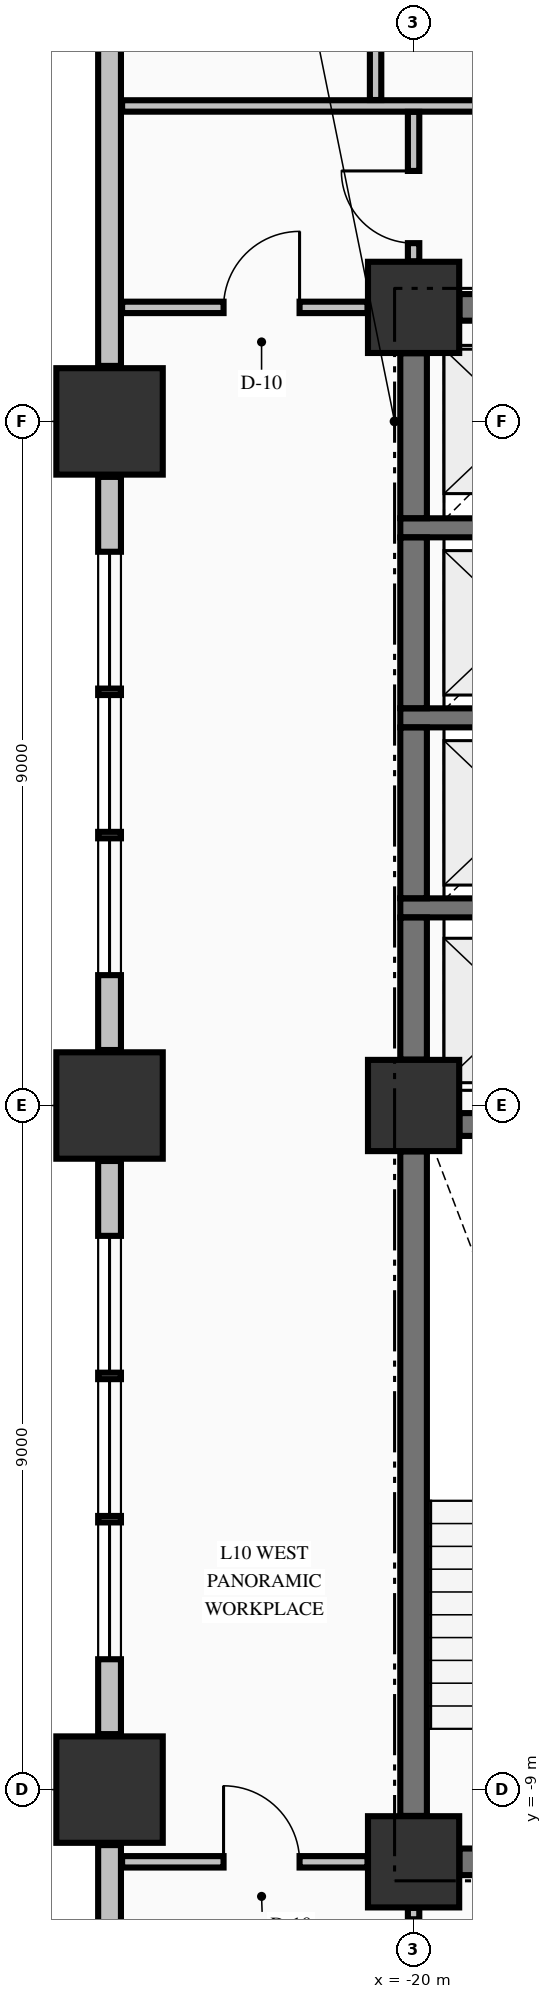
"""IFC4 building model, lengths in metres.
Left out: names, types, materials, properties, quantities, classifications, styles, units other than length and angle.
Written with IfcOpenShell. Run it as: python <this file> out.ifc"""

import sys

from ifc_helpers import new_model, si_unit, direction, frame, frame_2d, origin, origin_2d, place, context, subcontext, project, spatial, rectangle, extrude, element, fill, save


model = new_model("IFC4")
c1 = context("Model", 3, precision=1e-05, world=origin(), true_north=direction((0.0, 1.0)))
c2 = subcontext(c1, "Body", "Model", "MODEL_VIEW")
j1 = project(units=[si_unit("LENGTHUNIT", "METRE"), si_unit("PLANEANGLEUNIT", "RADIAN")], contexts=[c1])
p1 = place(None, origin())
s1 = spatial("IfcSite", under=j1, at=p1, CompositionType="ELEMENT")
p2 = place(p1, origin())
s2 = spatial("IfcBuilding", under=s1, at=p2, CompositionType="ELEMENT")
p3 = place(p2, frame((0.0, 0.0, 45.05)))
s3 = spatial("IfcBuildingStorey", under=s2, at=p3, CompositionType="ELEMENT", Elevation=45.05)
for number, where, z_axis, x_axis in (
    (1, (-24.0, -9.0, -0.25), (0.0, 0.0, 1.0), (1.0, 0.0, 0.0)),
    (2, (-24.0, 0.0, -0.25), (0.0, 0.0, 1.0), (1.0, 0.0, 0.0)),
    (3, (-24.0, 9.0, -0.25), (0.0, 0.0, 1.0), (1.0, 0.0, 0.0)),
):
    element("IfcColumn", number, at=place(p3, frame(where, z_axis=z_axis, x_axis=x_axis)), inside=s3, PredefinedType="COLUMN", context=c2, shape_type="SweptSolid", body=[
        extrude(rectangle(XDim=1.4, YDim=1.4, at=origin_2d()), origin(), (0.0, 0.0, 1.0), 3.57),
    ])
for number, where, z_axis, x_axis in (
    (4, (-20.0, -9.95, -0.25), (0.0, 0.0, 1.0), (1.0, 0.0, 0.0)),
    (5, (-20.0, 10.5, -0.25), (0.0, 0.0, 1.0), (1.0, 0.0, 0.0)),
    (6, (-20.0, 0.0, -0.25), (0.0, 0.0, 1.0), (1.0, 0.0, 0.0)),
):
    element("IfcColumn", number, at=place(p3, frame(where, z_axis=z_axis, x_axis=x_axis)), inside=s3, PredefinedType="COLUMN", context=c2, shape_type="SweptSolid", body=[
        extrude(rectangle(XDim=1.2, YDim=1.2, at=origin_2d()), origin(), (0.0, 0.0, 1.0), 3.57),
    ])
p4 = place(p3, frame((-24.0, -9.73, 0.0), z_axis=(0.0, 0.0, 1.0), x_axis=(0.0, -1.0, 0.0)))
e7 = element("IfcWall", 7, at=p4, inside=s3, PredefinedType="STANDARD", context=c2, shape_type="SweptSolid", body=[
    extrude(rectangle(XDim=12.54, YDim=0.3, at=frame_2d((6.27, 0.0))), origin(), (0.0, 0.0, 1.0), 2.712),
])
p5 = place(p3, frame((-24.0, -0.73, 0.0), z_axis=(0.0, 0.0, 1.0), x_axis=(0.0, -1.0, 0.0)))
e8 = element("IfcWall", 8, at=p5, inside=s3, PredefinedType="STANDARD", context=c2, shape_type="SweptSolid", body=[
    extrude(rectangle(XDim=7.54, YDim=0.3, at=frame_2d((3.77, 0.0))), origin(), (0.0, 0.0, 1.0), 2.712),
])
p6 = place(p5, frame((0.985, 0.0, 0.78)))
e9 = element("IfcOpeningElement", 9, at=p6, cuts=e8, PredefinedType="OPENING", context=c2, shape_type="SweptSolid", body=[
    extrude(rectangle(XDim=1.8, YDim=1.72, at=frame_2d((0.9, 0.86))), frame((0.0, 0.16, 0.0), z_axis=(0.0, -1.0, 0.0), x_axis=(1.0, 0.0, 0.0)), (0.0, 0.0, 1.0), 0.32),
])
p7 = place(p5, frame((2.87, 0.0, 0.78)))
e10 = element("IfcOpeningElement", 10, at=p7, cuts=e8, PredefinedType="OPENING", context=c2, shape_type="SweptSolid", body=[
    extrude(rectangle(XDim=1.8, YDim=1.72, at=frame_2d((0.9, 0.86))), frame((0.0, 0.16, 0.0), z_axis=(0.0, -1.0, 0.0), x_axis=(1.0, 0.0, 0.0)), (0.0, 0.0, 1.0), 0.32),
])
p8 = place(p5, frame((4.755, 0.0, 0.78)))
e11 = element("IfcOpeningElement", 11, at=p8, cuts=e8, PredefinedType="OPENING", context=c2, shape_type="SweptSolid", body=[
    extrude(rectangle(XDim=1.8, YDim=1.72, at=frame_2d((0.9, 0.86))), frame((0.0, 0.16, 0.0), z_axis=(0.0, -1.0, 0.0), x_axis=(1.0, 0.0, 0.0)), (0.0, 0.0, 1.0), 0.32),
])
p9 = place(p3, frame((-24.0, 8.27, 0.0), z_axis=(0.0, 0.0, 1.0), x_axis=(0.0, -1.0, 0.0)))
e12 = element("IfcWall", 12, at=p9, inside=s3, PredefinedType="STANDARD", context=c2, shape_type="SweptSolid", body=[
    extrude(rectangle(XDim=7.54, YDim=0.3, at=frame_2d((3.77, 0.0))), origin(), (0.0, 0.0, 1.0), 2.712),
])
p10 = place(p9, frame((0.985, 0.0, 0.78)))
e13 = element("IfcOpeningElement", 13, at=p10, cuts=e12, PredefinedType="OPENING", context=c2, shape_type="SweptSolid", body=[
    extrude(rectangle(XDim=1.8, YDim=1.72, at=frame_2d((0.9, 0.86))), frame((0.0, 0.16, 0.0), z_axis=(0.0, -1.0, 0.0), x_axis=(1.0, 0.0, 0.0)), (0.0, 0.0, 1.0), 0.32),
])
p11 = place(p9, frame((2.87, 0.0, 0.78)))
e14 = element("IfcOpeningElement", 14, at=p11, cuts=e12, PredefinedType="OPENING", context=c2, shape_type="SweptSolid", body=[
    extrude(rectangle(XDim=1.8, YDim=1.72, at=frame_2d((0.9, 0.86))), frame((0.0, 0.16, 0.0), z_axis=(0.0, -1.0, 0.0), x_axis=(1.0, 0.0, 0.0)), (0.0, 0.0, 1.0), 0.32),
])
p12 = place(p9, frame((4.755, 0.0, 0.78)))
e15 = element("IfcOpeningElement", 15, at=p12, cuts=e12, PredefinedType="OPENING", context=c2, shape_type="SweptSolid", body=[
    extrude(rectangle(XDim=1.8, YDim=1.72, at=frame_2d((0.9, 0.86))), frame((0.0, 0.16, 0.0), z_axis=(0.0, -1.0, 0.0), x_axis=(1.0, 0.0, 0.0)), (0.0, 0.0, 1.0), 0.32),
])
p13 = place(p3, frame((-24.0, 22.27, 0.0), z_axis=(0.0, 0.0, 1.0), x_axis=(0.0, -1.0, 0.0)))
e16 = element("IfcWall", 16, at=p13, inside=s3, PredefinedType="STANDARD", context=c2, shape_type="SweptSolid", body=[
    extrude(rectangle(XDim=12.54, YDim=0.3, at=frame_2d((6.27, 0.0))), origin(), (0.0, 0.0, 1.0), 2.712),
])
p14 = place(p3, frame((-19.396, -9.95, 0.0), z_axis=(0.0, 0.0, 1.0), x_axis=(1.0, 0.0, 0.0)))
e17 = element("IfcWall", 17, at=p14, inside=s3, PredefinedType="SHEAR", context=c2, shape_type="SweptSolid", body=[
    extrude(rectangle(XDim=4.696, YDim=0.35, at=frame_2d((2.348, 0.0))), origin(), (0.0, 0.0, 1.0), 3.32),
])
p15 = place(p14, frame((0.571, 0.0, 0.0)))
e18 = element("IfcOpeningElement", 18, at=p15, cuts=e17, PredefinedType="OPENING", context=c2, shape_type="SweptSolid", body=[
    extrude(rectangle(XDim=1.05, YDim=2.15, at=frame_2d((0.525, 1.075))), frame((0.0, 0.185, 0.0), z_axis=(0.0, -1.0, 0.0), x_axis=(1.0, 0.0, 0.0)), (0.0, 0.0, 1.0), 0.37),
])
p16 = place(p3, frame((-19.396, -0.25, 0.0), z_axis=(0.0, 0.0, 1.0), x_axis=(1.0, 0.0, 0.0)))
e19 = element("IfcWall", 19, at=p16, inside=s3, PredefinedType="SHEAR", context=c2, shape_type="SweptSolid", body=[
    extrude(rectangle(XDim=7.792, YDim=0.3, at=frame_2d((3.896, 0.0))), origin(), (0.0, 0.0, 1.0), 3.32),
])
p17 = place(p16, frame((5.696, 0.0, 0.0)))
e20 = element("IfcOpeningElement", 20, at=p17, cuts=e19, PredefinedType="OPENING", context=c2, shape_type="SweptSolid", body=[
    extrude(rectangle(XDim=1.1, YDim=2.15, at=frame_2d((0.55, 1.075))), frame((0.0, 0.16, 0.0), z_axis=(0.0, -1.0, 0.0), x_axis=(1.0, 0.0, 0.0)), (0.0, 0.0, 1.0), 0.32),
])
for number, where, z_axis, x_axis in (
    (21, (-20.175, 2.6, 0.0), (0.0, 0.0, 1.0), (1.0, 0.0, 0.0)),
    (22, (-20.175, 5.1, 0.0), (0.0, 0.0, 1.0), (1.0, 0.0, 0.0)),
    (23, (-20.175, 7.6, 0.0), (0.0, 0.0, 1.0), (1.0, 0.0, 0.0)),
):
    element("IfcWall", number, at=place(p3, frame(where, z_axis=z_axis, x_axis=x_axis)), inside=s3, PredefinedType="SOLIDWALL", context=c2, shape_type="SweptSolid", body=[
        extrude(rectangle(XDim=3.1, YDim=0.25, at=frame_2d((1.55, 0.0))), origin(), (0.0, 0.0, 1.0), 3.32),
    ])
p18 = place(p3, frame((-19.396, 10.5, 0.0), z_axis=(0.0, 0.0, 1.0), x_axis=(1.0, 0.0, 0.0)))
e24 = element("IfcWall", 24, at=p18, inside=s3, PredefinedType="SHEAR", context=c2, shape_type="SweptSolid", body=[
    extrude(rectangle(XDim=4.696, YDim=0.35, at=frame_2d((2.348, 0.0))), origin(), (0.0, 0.0, 1.0), 3.32),
])
p19 = place(p18, frame((2.796, 0.0, 0.0)))
e25 = element("IfcOpeningElement", 25, at=p19, cuts=e24, PredefinedType="OPENING", context=c2, shape_type="SweptSolid", body=[
    extrude(rectangle(XDim=1.2, YDim=2.15, at=frame_2d((0.6, 1.075))), frame((0.0, 0.185, 0.0), z_axis=(0.0, -1.0, 0.0), x_axis=(1.0, 0.0, 0.0)), (0.0, 0.0, 1.0), 0.37),
])
p20 = place(p3, frame((-23.835, -9.95, 0.0), z_axis=(0.0, 0.0, 1.0), x_axis=(1.0, 0.0, 0.0)))
e26 = element("IfcWall", 26, at=p20, inside=s3, PredefinedType="PARTITIONING", context=c2, shape_type="SweptSolid", body=[
    extrude(rectangle(XDim=3.229, YDim=0.15, at=frame_2d((1.615, 0.0))), origin(), (0.0, 0.0, 1.0), 3.32),
])
p21 = place(p20, frame((1.335, 0.0, 0.0)))
e27 = element("IfcOpeningElement", 27, at=p21, cuts=e26, PredefinedType="OPENING", context=c2, shape_type="SweptSolid", body=[
    extrude(rectangle(XDim=1.0, YDim=2.15, at=frame_2d((0.5, 1.075))), frame((0.0, 0.085, 0.0), z_axis=(0.0, -1.0, 0.0), x_axis=(1.0, 0.0, 0.0)), (0.0, 0.0, 1.0), 0.17),
])
p22 = place(p3, frame((-23.835, 10.5, 0.0), z_axis=(0.0, 0.0, 1.0), x_axis=(1.0, 0.0, 0.0)))
e28 = element("IfcWall", 28, at=p22, inside=s3, PredefinedType="PARTITIONING", context=c2, shape_type="SweptSolid", body=[
    extrude(rectangle(XDim=3.229, YDim=0.15, at=frame_2d((1.615, 0.0))), origin(), (0.0, 0.0, 1.0), 3.32),
])
p23 = place(p22, frame((1.335, 0.0, 0.0)))
e29 = element("IfcOpeningElement", 29, at=p23, cuts=e28, PredefinedType="OPENING", context=c2, shape_type="SweptSolid", body=[
    extrude(rectangle(XDim=1.0, YDim=2.15, at=frame_2d((0.5, 1.075))), frame((0.0, 0.085, 0.0), z_axis=(0.0, -1.0, 0.0), x_axis=(1.0, 0.0, 0.0)), (0.0, 0.0, 1.0), 0.17),
])
p24 = place(p3, frame((-23.835, 13.15, 0.0), z_axis=(0.0, 0.0, 1.0), x_axis=(1.0, 0.0, 0.0)))
e30 = element("IfcWall", 30, at=p24, inside=s3, PredefinedType="PARTITIONING", context=c2, shape_type="SweptSolid", body=[
    extrude(rectangle(XDim=52.67, YDim=0.15, at=frame_2d((26.335, 0.0))), origin(), (0.0, 0.0, 1.0), 3.32),
])
p25 = place(p24, frame((8.56, 0.0, 0.0)))
e31 = element("IfcOpeningElement", 31, at=p25, cuts=e30, PredefinedType="OPENING", context=c2, shape_type="SweptSolid", body=[
    extrude(rectangle(XDim=1.05, YDim=2.15, at=frame_2d((0.525, 1.075))), frame((0.0, 0.085, 0.0), z_axis=(0.0, -1.0, 0.0), x_axis=(1.0, 0.0, 0.0)), (0.0, 0.0, 1.0), 0.17),
])
p26 = place(p24, frame((16.56, 0.0, 0.0)))
e32 = element("IfcOpeningElement", 32, at=p26, cuts=e30, PredefinedType="OPENING", context=c2, shape_type="SweptSolid", body=[
    extrude(rectangle(XDim=0.95, YDim=2.15, at=frame_2d((0.475, 1.075))), frame((0.0, 0.085, 0.0), z_axis=(0.0, -1.0, 0.0), x_axis=(1.0, 0.0, 0.0)), (0.0, 0.0, 1.0), 0.17),
])
p27 = place(p24, frame((23.81, 0.0, 0.0)))
e33 = element("IfcOpeningElement", 33, at=p27, cuts=e30, PredefinedType="OPENING", context=c2, shape_type="SweptSolid", body=[
    extrude(rectangle(XDim=0.95, YDim=2.15, at=frame_2d((0.475, 1.075))), frame((0.0, 0.085, 0.0), z_axis=(0.0, -1.0, 0.0), x_axis=(1.0, 0.0, 0.0)), (0.0, 0.0, 1.0), 0.17),
])
p28 = place(p24, frame((28.36, 0.0, 0.0)))
e34 = element("IfcOpeningElement", 34, at=p28, cuts=e30, PredefinedType="OPENING", context=c2, shape_type="SweptSolid", body=[
    extrude(rectangle(XDim=0.95, YDim=2.15, at=frame_2d((0.475, 1.075))), frame((0.0, 0.085, 0.0), z_axis=(0.0, -1.0, 0.0), x_axis=(1.0, 0.0, 0.0)), (0.0, 0.0, 1.0), 0.17),
])
p29 = place(p24, frame((35.61, 0.0, 0.0)))
e35 = element("IfcOpeningElement", 35, at=p29, cuts=e30, PredefinedType="OPENING", context=c2, shape_type="SweptSolid", body=[
    extrude(rectangle(XDim=0.95, YDim=2.15, at=frame_2d((0.475, 1.075))), frame((0.0, 0.085, 0.0), z_axis=(0.0, -1.0, 0.0), x_axis=(1.0, 0.0, 0.0)), (0.0, 0.0, 1.0), 0.17),
])
p30 = place(p24, frame((40.16, 0.0, 0.0)))
e36 = element("IfcOpeningElement", 36, at=p30, cuts=e30, PredefinedType="OPENING", context=c2, shape_type="SweptSolid", body=[
    extrude(rectangle(XDim=1.05, YDim=2.15, at=frame_2d((0.525, 1.075))), frame((0.0, 0.085, 0.0), z_axis=(0.0, -1.0, 0.0), x_axis=(1.0, 0.0, 0.0)), (0.0, 0.0, 1.0), 0.17),
])
p31 = place(p3, frame((-20.0, -9.346, 0.0), z_axis=(0.0, 0.0, 1.0), x_axis=(0.0, 1.0, 0.0)))
e37 = element("IfcWall", 37, at=p31, inside=s3, PredefinedType="SHEAR", context=c2, shape_type="SweptSolid", body=[
    extrude(rectangle(XDim=8.742, YDim=0.35, at=frame_2d((4.371, 0.0))), origin(), (0.0, 0.0, 1.0), 3.32),
])
p32 = place(p3, frame((-20.0, 0.604, 0.0), z_axis=(0.0, 0.0, 1.0), x_axis=(0.0, 1.0, 0.0)))
e38 = element("IfcWall", 38, at=p32, inside=s3, PredefinedType="SHEAR", context=c2, shape_type="SweptSolid", body=[
    extrude(rectangle(XDim=1.869, YDim=0.35, at=frame_2d((0.935, 0.0))), origin(), (0.0, 0.0, 1.0), 3.32),
])
for number, where, z_axis, x_axis in (
    (39, (-20.0, 2.727, 0.0), (0.0, 0.0, 1.0), (0.0, 1.0, 0.0)),
    (40, (-20.0, 5.227, 0.0), (0.0, 0.0, 1.0), (0.0, 1.0, 0.0)),
):
    element("IfcWall", number, at=place(p3, frame(where, z_axis=z_axis, x_axis=x_axis)), inside=s3, PredefinedType="SHEAR", context=c2, shape_type="SweptSolid", body=[
        extrude(rectangle(XDim=2.246, YDim=0.35, at=frame_2d((1.123, 0.0))), origin(), (0.0, 0.0, 1.0), 3.32),
    ])
p33 = place(p3, frame((-20.0, 7.727, 0.0), z_axis=(0.0, 0.0, 1.0), x_axis=(0.0, 1.0, 0.0)))
e41 = element("IfcWall", 41, at=p33, inside=s3, PredefinedType="SHEAR", context=c2, shape_type="SweptSolid", body=[
    extrude(rectangle(XDim=2.169, YDim=0.35, at=frame_2d((1.084, 0.0))), origin(), (0.0, 0.0, 1.0), 3.32),
])
p34 = place(p3, frame((-20.5, 13.228, 0.0), z_axis=(0.0, 0.0, 1.0), x_axis=(0.0, 1.0, 0.0)))
e42 = element("IfcWall", 42, at=p34, inside=s3, PredefinedType="PARTITIONING", context=c2, shape_type="SweptSolid", body=[
    extrude(rectangle(XDim=9.066, YDim=0.15, at=frame_2d((4.533, 0.0))), origin(), (0.0, 0.0, 1.0), 3.32),
])
p35 = place(p3, frame((-20.0, -12.222, 0.0), z_axis=(0.0, 0.0, 1.0), x_axis=(0.0, 1.0, 0.0)))
e43 = element("IfcWall", 43, at=p35, inside=s3, PredefinedType="PARTITIONING", context=c2, shape_type="SweptSolid", body=[
    extrude(rectangle(XDim=1.666, YDim=0.15, at=frame_2d((0.833, 0.0))), origin(), (0.0, 0.0, 1.0), 3.32),
])
p36 = place(p35, frame((0.566, 0.0, 0.0)))
e44 = element("IfcOpeningElement", 44, at=p36, cuts=e43, PredefinedType="OPENING", context=c2, shape_type="SweptSolid", body=[
    extrude(rectangle(XDim=0.95, YDim=2.15, at=frame_2d((0.475, 1.075))), frame((0.0, 0.085, 0.0), z_axis=(0.0, -1.0, 0.0), x_axis=(1.0, 0.0, 0.0)), (0.0, 0.0, 1.0), 0.17),
])
p37 = place(p3, frame((-20.0, 11.106, 0.0), z_axis=(0.0, 0.0, 1.0), x_axis=(0.0, 1.0, 0.0)))
e45 = element("IfcWall", 45, at=p37, inside=s3, PredefinedType="PARTITIONING", context=c2, shape_type="SweptSolid", body=[
    extrude(rectangle(XDim=1.966, YDim=0.15, at=frame_2d((0.983, 0.0))), origin(), (0.0, 0.0, 1.0), 3.32),
])
p38 = place(p37, frame((0.239, 0.0, 0.0)))
e46 = element("IfcOpeningElement", 46, at=p38, cuts=e45, PredefinedType="OPENING", context=c2, shape_type="SweptSolid", body=[
    extrude(rectangle(XDim=0.95, YDim=2.15, at=frame_2d((0.475, 1.075))), frame((0.0, 0.085, 0.0), z_axis=(0.0, -1.0, 0.0), x_axis=(1.0, 0.0, 0.0)), (0.0, 0.0, 1.0), 0.17),
])
p39 = place(p6, origin())
e47 = element("IfcWindow", 47, at=p39, inside=s3, PartitioningType="SINGLE_PANEL", PredefinedType="WINDOW", context=c2, shape_type="SweptSolid", body=[
    extrude(rectangle(XDim=1.8, YDim=1.72, at=frame_2d((0.9, 0.86))), frame((0.0, 0.03, 0.0), z_axis=(0.0, -1.0, 0.0), x_axis=(1.0, 0.0, 0.0)), (0.0, 0.0, 1.0), 0.06),
])
fill(e9, e47)
p40 = place(p7, origin())
e48 = element("IfcWindow", 48, at=p40, inside=s3, PartitioningType="SINGLE_PANEL", PredefinedType="WINDOW", context=c2, shape_type="SweptSolid", body=[
    extrude(rectangle(XDim=1.8, YDim=1.72, at=frame_2d((0.9, 0.86))), frame((0.0, 0.03, 0.0), z_axis=(0.0, -1.0, 0.0), x_axis=(1.0, 0.0, 0.0)), (0.0, 0.0, 1.0), 0.06),
])
fill(e10, e48)
p41 = place(p8, origin())
e49 = element("IfcWindow", 49, at=p41, inside=s3, PartitioningType="SINGLE_PANEL", PredefinedType="WINDOW", context=c2, shape_type="SweptSolid", body=[
    extrude(rectangle(XDim=1.8, YDim=1.72, at=frame_2d((0.9, 0.86))), frame((0.0, 0.03, 0.0), z_axis=(0.0, -1.0, 0.0), x_axis=(1.0, 0.0, 0.0)), (0.0, 0.0, 1.0), 0.06),
])
fill(e11, e49)
p42 = place(p10, origin())
e50 = element("IfcWindow", 50, at=p42, inside=s3, PartitioningType="SINGLE_PANEL", PredefinedType="WINDOW", context=c2, shape_type="SweptSolid", body=[
    extrude(rectangle(XDim=1.8, YDim=1.72, at=frame_2d((0.9, 0.86))), frame((0.0, 0.03, 0.0), z_axis=(0.0, -1.0, 0.0), x_axis=(1.0, 0.0, 0.0)), (0.0, 0.0, 1.0), 0.06),
])
fill(e13, e50)
p43 = place(p11, origin())
e51 = element("IfcWindow", 51, at=p43, inside=s3, PartitioningType="SINGLE_PANEL", PredefinedType="WINDOW", context=c2, shape_type="SweptSolid", body=[
    extrude(rectangle(XDim=1.8, YDim=1.72, at=frame_2d((0.9, 0.86))), frame((0.0, 0.03, 0.0), z_axis=(0.0, -1.0, 0.0), x_axis=(1.0, 0.0, 0.0)), (0.0, 0.0, 1.0), 0.06),
])
fill(e14, e51)
p44 = place(p12, origin())
e52 = element("IfcWindow", 52, at=p44, inside=s3, PartitioningType="SINGLE_PANEL", PredefinedType="WINDOW", context=c2, shape_type="SweptSolid", body=[
    extrude(rectangle(XDim=1.8, YDim=1.72, at=frame_2d((0.9, 0.86))), frame((0.0, 0.03, 0.0), z_axis=(0.0, -1.0, 0.0), x_axis=(1.0, 0.0, 0.0)), (0.0, 0.0, 1.0), 0.06),
])
fill(e15, e52)
p45 = place(p38, origin())
e53 = element("IfcDoor", 53, at=p45, inside=s3, OperationType="SINGLE_SWING_RIGHT", PredefinedType="DOOR", context=c2, shape_type="SweptSolid", body=[
    extrude(rectangle(XDim=0.95, YDim=2.15, at=frame_2d((0.475, 1.075))), frame((0.0, 0.025, 0.0), z_axis=(0.0, -1.0, 0.0), x_axis=(1.0, 0.0, 0.0)), (0.0, 0.0, 1.0), 0.05),
])
fill(e46, e53)
p46 = place(p36, origin())
e54 = element("IfcDoor", 54, at=p46, inside=s3, OperationType="SINGLE_SWING_LEFT", PredefinedType="DOOR", context=c2, shape_type="SweptSolid", body=[
    extrude(rectangle(XDim=0.95, YDim=2.15, at=frame_2d((0.475, 1.075))), frame((0.0, 0.025, 0.0), z_axis=(0.0, -1.0, 0.0), x_axis=(1.0, 0.0, 0.0)), (0.0, 0.0, 1.0), 0.05),
])
fill(e44, e54)
p47 = place(p23, origin())
e55 = element("IfcDoor", 55, at=p47, inside=s3, OperationType="SINGLE_SWING_RIGHT", PredefinedType="DOOR", context=c2, shape_type="SweptSolid", body=[
    extrude(rectangle(XDim=1.0, YDim=2.15, at=frame_2d((0.5, 1.075))), frame((0.0, 0.025, 0.0), z_axis=(0.0, -1.0, 0.0), x_axis=(1.0, 0.0, 0.0)), (0.0, 0.0, 1.0), 0.05),
])
fill(e29, e55)
p48 = place(p21, origin())
e56 = element("IfcDoor", 56, at=p48, inside=s3, OperationType="SINGLE_SWING_LEFT", PredefinedType="DOOR", context=c2, shape_type="SweptSolid", body=[
    extrude(rectangle(XDim=1.0, YDim=2.15, at=frame_2d((0.5, 1.075))), frame((0.0, 0.025, 0.0), z_axis=(0.0, -1.0, 0.0), x_axis=(1.0, 0.0, 0.0)), (0.0, 0.0, 1.0), 0.05),
])
fill(e27, e56)
save(model, sys.argv[1])
